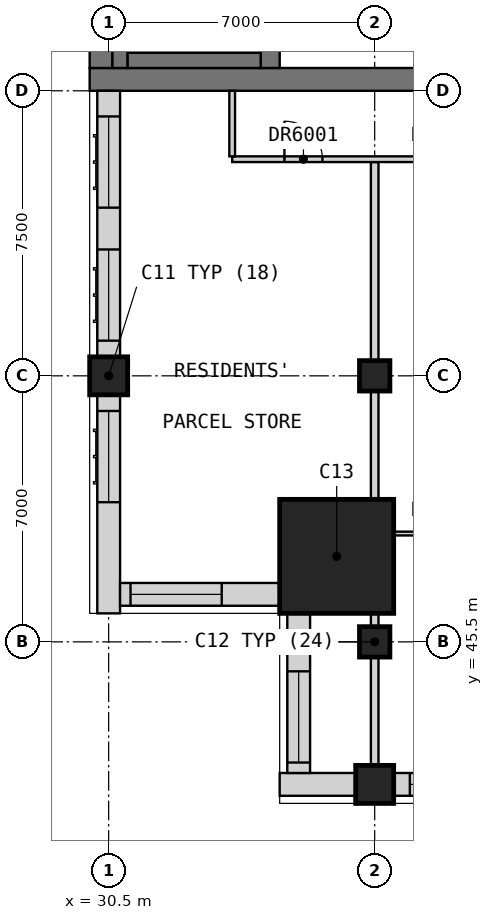
"""IFC4 building model, lengths in metres.
Left out: names, types, materials, properties, quantities, classifications, styles, units other than length and angle.
Written with IfcOpenShell. Run it as: python <this file> out.ifc"""

import sys

from ifc_helpers import new_model, si_unit, direction, frame, frame_2d, origin, origin_2d, place, context, subcontext, project, spatial, rectangle, extrude, element, fill, save


model = new_model("IFC4")
c1 = context("Model", 3, precision=1e-05, world=origin(), true_north=direction((0.0, 1.0)))
c2 = subcontext(c1, "Body", "Model", "MODEL_VIEW")
j1 = project(units=[si_unit("LENGTHUNIT", "METRE"), si_unit("PLANEANGLEUNIT", "RADIAN")], contexts=[c1])
p1 = place(None, origin())
s1 = spatial("IfcSite", under=j1, at=p1, CompositionType="ELEMENT")
p2 = place(p1, origin())
s2 = spatial("IfcBuilding", under=s1, at=p2, CompositionType="ELEMENT")
p3 = place(p2, frame((0.0, 0.0, 226.7)))
s3 = spatial("IfcBuildingStorey", under=s2, at=p3, CompositionType="ELEMENT", Elevation=226.7)
for number, where, z_axis, x_axis in (
    (1, (37.5, 41.75, 0.0), (0.0, 0.0, 1.0), (1.0, 0.0, 0.0)),
    (2, (30.5, 52.5, 0.0), (0.0, 0.0, 1.0), (1.0, 0.0, 0.0)),
):
    element("IfcColumn", number, at=place(p3, frame(where, z_axis=z_axis, x_axis=x_axis)), inside=s3, PredefinedType="COLUMN", context=c2, shape_type="SweptSolid", body=[
        extrude(rectangle(XDim=1.0, YDim=1.0, at=origin_2d()), origin(), (0.0, 0.0, 1.0), 3.5),
    ])
for number, where, z_axis, x_axis in (
    (3, (37.5, 45.5, 0.0), (0.0, 0.0, 1.0), (1.0, 0.0, 0.0)),
    (4, (37.5, 52.5, 0.0), (0.0, 0.0, 1.0), (1.0, 0.0, 0.0)),
):
    element("IfcColumn", number, at=place(p3, frame(where, z_axis=z_axis, x_axis=x_axis)), inside=s3, PredefinedType="COLUMN", context=c2, shape_type="SweptSolid", body=[
        extrude(rectangle(XDim=0.8, YDim=0.8, at=origin_2d()), origin(), (0.0, 0.0, 1.0), 3.5),
    ])
p4 = place(p3, frame((36.5, 47.75, 0.0), z_axis=(0.0, 0.0, 1.0), x_axis=(1.0, 0.0, 0.0)))
e5 = element("IfcColumn", 5, at=p4, inside=s3, PredefinedType="COLUMN", context=c2, shape_type="SweptSolid", body=[
    extrude(rectangle(XDim=3.0, YDim=3.0, at=origin_2d()), origin(), (0.0, 0.0, 1.0), 3.5),
])
p5 = place(p3, frame((30.0, 60.3, 0.0), z_axis=(0.0, 0.0, 1.0), x_axis=(1.0, 0.0, 0.0)))
e6 = element("IfcWall", 6, at=p5, inside=s3, PredefinedType="SHEAR", context=c2, shape_type="SweptSolid", body=[
    extrude(rectangle(XDim=30.0, YDim=0.6, at=frame_2d((15.0, 0.0))), origin(), (0.0, 0.0, 1.0), 3.5),
])
p6 = place(p5, frame((21.9, 0.0, 0.0)))
e7 = element("IfcOpeningElement", 7, at=p6, cuts=e6, PredefinedType="OPENING", context=c2, shape_type="SweptSolid", body=[
    extrude(rectangle(XDim=1.8, YDim=2.1, at=frame_2d((0.9, 1.05))), frame((0.0, 0.31, 0.0), z_axis=(0.0, -1.0, 0.0), x_axis=(1.0, 0.0, 0.0)), (0.0, 0.0, 1.0), 0.62),
])
p7 = place(p5, frame((26.5, 0.0, 0.0)))
e8 = element("IfcOpeningElement", 8, at=p7, cuts=e6, PredefinedType="OPENING", context=c2, shape_type="SweptSolid", body=[
    extrude(rectangle(XDim=1.2, YDim=2.1, at=frame_2d((0.6, 1.05))), frame((0.0, 0.31, 0.0), z_axis=(0.0, -1.0, 0.0), x_axis=(1.0, 0.0, 0.0)), (0.0, 0.0, 1.0), 0.62),
])
p8 = place(p3, frame((30.3, 60.6, 0.0), z_axis=(0.0, 0.0, 1.0), x_axis=(0.0, 1.0, 0.0)))
e9 = element("IfcWall", 9, at=p8, inside=s3, PredefinedType="SHEAR", context=c2, shape_type="SweptSolid", body=[
    extrude(rectangle(XDim=21.3, YDim=0.6, at=frame_2d((10.65, 0.0))), origin(), (0.0, 0.0, 1.0), 3.5),
])
p9 = place(p3, frame((34.75, 60.6, 0.0), z_axis=(0.0, 0.0, 1.0), x_axis=(0.0, 1.0, 0.0)))
e10 = element("IfcWall", 10, at=p9, inside=s3, PredefinedType="SHEAR", context=c2, shape_type="SweptSolid", body=[
    extrude(rectangle(XDim=3.6, YDim=0.5, at=frame_2d((1.8, 0.0))), origin(), (0.0, 0.0, 1.0), 3.5),
])
p10 = place(p3, frame((35.0, 41.75, 0.0), z_axis=(0.0, 0.0, 1.0), x_axis=(1.0, 0.0, 0.0)))
e11 = element("IfcWall", 11, at=p10, inside=s3, PredefinedType="SOLIDWALL", context=c2, shape_type="SweptSolid", body=[
    extrude(rectangle(XDim=2.0, YDim=0.6, at=frame_2d((1.0, 0.0))), origin(), (0.0, 0.0, 1.0), 3.25),
])
p11 = place(p3, frame((38.0, 41.75, 0.0), z_axis=(0.0, 0.0, 1.0), x_axis=(1.0, 0.0, 0.0)))
e12 = element("IfcWall", 12, at=p11, inside=s3, PredefinedType="SOLIDWALL", context=c2, shape_type="SweptSolid", body=[
    extrude(rectangle(XDim=6.5, YDim=0.6, at=frame_2d((3.25, 0.0))), origin(), (0.0, 0.0, 1.0), 2.75),
])
p12 = place(p11, frame((0.425, 0.0, 0.8)))
e13 = element("IfcOpeningElement", 13, at=p12, cuts=e12, PredefinedType="OPENING", context=c2, shape_type="SweptSolid", body=[
    extrude(rectangle(XDim=2.4, YDim=1.8, at=frame_2d((1.2, 0.9))), frame((0.0, 0.31, 0.0), z_axis=(0.0, -1.0, 0.0), x_axis=(1.0, 0.0, 0.0)), (0.0, 0.0, 1.0), 0.62),
])
p13 = place(p11, frame((3.675, 0.0, 0.8)))
e14 = element("IfcOpeningElement", 14, at=p13, cuts=e12, PredefinedType="OPENING", context=c2, shape_type="SweptSolid", body=[
    extrude(rectangle(XDim=2.4, YDim=1.8, at=frame_2d((1.2, 0.9))), frame((0.0, 0.31, 0.0), z_axis=(0.0, -1.0, 0.0), x_axis=(1.0, 0.0, 0.0)), (0.0, 0.0, 1.0), 0.62),
])
p14 = place(p3, frame((30.5, 60.0, 0.0), z_axis=(0.0, 0.0, 1.0), x_axis=(0.0, -1.0, 0.0)))
e15 = element("IfcWall", 15, at=p14, inside=s3, PredefinedType="SOLIDWALL", context=c2, shape_type="SweptSolid", body=[
    extrude(rectangle(XDim=7.0, YDim=0.6, at=frame_2d((3.5, 0.0))), origin(), (0.0, 0.0, 1.0), 3.25),
])
p15 = place(p14, frame((4.175, 0.0, 0.8)))
e16 = element("IfcOpeningElement", 16, at=p15, cuts=e15, PredefinedType="OPENING", context=c2, shape_type="SweptSolid", body=[
    extrude(rectangle(XDim=2.4, YDim=1.8, at=frame_2d((1.2, 0.9))), frame((0.0, 0.31, 0.0), z_axis=(0.0, -1.0, 0.0), x_axis=(1.0, 0.0, 0.0)), (0.0, 0.0, 1.0), 0.62),
])
p16 = place(p14, frame((0.675, 0.0, 0.8)))
e17 = element("IfcOpeningElement", 17, at=p16, cuts=e15, PredefinedType="OPENING", context=c2, shape_type="SweptSolid", body=[
    extrude(rectangle(XDim=2.4, YDim=1.8, at=frame_2d((1.2, 0.9))), frame((0.0, 0.31, 0.0), z_axis=(0.0, -1.0, 0.0), x_axis=(1.0, 0.0, 0.0)), (0.0, 0.0, 1.0), 0.62),
])
p17 = place(p3, frame((30.5, 52.0, 0.0), z_axis=(0.0, 0.0, 1.0), x_axis=(0.0, -1.0, 0.0)))
e18 = element("IfcWall", 18, at=p17, inside=s3, PredefinedType="SOLIDWALL", context=c2, shape_type="SweptSolid", body=[
    extrude(rectangle(XDim=5.75, YDim=0.6, at=frame_2d((2.875, 0.0))), origin(), (0.0, 0.0, 1.0), 2.75),
])
p18 = place(p17, frame((0.425, 0.0, 0.8)))
e19 = element("IfcOpeningElement", 19, at=p18, cuts=e18, PredefinedType="OPENING", context=c2, shape_type="SweptSolid", body=[
    extrude(rectangle(XDim=2.4, YDim=1.8, at=frame_2d((1.2, 0.9))), frame((0.0, 0.31, 0.0), z_axis=(0.0, -1.0, 0.0), x_axis=(1.0, 0.0, 0.0)), (0.0, 0.0, 1.0), 0.62),
])
p19 = place(p3, frame((30.8, 46.75, 0.0), z_axis=(0.0, 0.0, 1.0), x_axis=(1.0, 0.0, 0.0)))
e20 = element("IfcWall", 20, at=p19, inside=s3, PredefinedType="SOLIDWALL", context=c2, shape_type="SweptSolid", body=[
    extrude(rectangle(XDim=4.2, YDim=0.6, at=frame_2d((2.1, 0.0))), origin(), (0.0, 0.0, 1.0), 3.25),
])
p20 = place(p19, frame((0.275, 0.0, 0.8)))
e21 = element("IfcOpeningElement", 21, at=p20, cuts=e20, PredefinedType="OPENING", context=c2, shape_type="SweptSolid", body=[
    extrude(rectangle(XDim=2.4, YDim=1.8, at=frame_2d((1.2, 0.9))), frame((0.0, 0.31, 0.0), z_axis=(0.0, -1.0, 0.0), x_axis=(1.0, 0.0, 0.0)), (0.0, 0.0, 1.0), 0.62),
])
p21 = place(p3, frame((35.5, 46.25, 0.0), z_axis=(0.0, 0.0, 1.0), x_axis=(0.0, -1.0, 0.0)))
e22 = element("IfcWall", 22, at=p21, inside=s3, PredefinedType="SOLIDWALL", context=c2, shape_type="SweptSolid", body=[
    extrude(rectangle(XDim=4.2, YDim=0.6, at=frame_2d((2.1, 0.0))), origin(), (0.0, 0.0, 1.0), 3.25),
])
p22 = place(p21, frame((1.525, 0.0, 0.8)))
e23 = element("IfcOpeningElement", 23, at=p22, cuts=e22, PredefinedType="OPENING", context=c2, shape_type="SweptSolid", body=[
    extrude(rectangle(XDim=2.4, YDim=1.8, at=frame_2d((1.2, 0.9))), frame((0.0, 0.31, 0.0), z_axis=(0.0, -1.0, 0.0), x_axis=(1.0, 0.0, 0.0)), (0.0, 0.0, 1.0), 0.62),
])
p23 = place(p3, frame((30.8, 60.6, 0.0), z_axis=(0.0, 0.0, 1.0), x_axis=(0.0, 1.0, 0.0)))
e24 = element("IfcWall", 24, at=p23, inside=s3, PredefinedType="SOLIDWALL", context=c2, shape_type="SweptSolid", body=[
    extrude(rectangle(XDim=21.3, YDim=0.4, at=frame_2d((10.65, 0.0))), origin(), (0.0, 0.0, 1.0), 3.25),
])
p24 = place(p3, frame((31.0, 60.8, 0.0), z_axis=(0.0, 0.0, 1.0), x_axis=(1.0, 0.0, 0.0)))
e25 = element("IfcWall", 25, at=p24, inside=s3, PredefinedType="SOLIDWALL", context=c2, shape_type="SweptSolid", body=[
    extrude(rectangle(XDim=3.5, YDim=0.4, at=frame_2d((1.75, 0.0))), origin(), (0.0, 0.0, 1.0), 3.25),
])
p25 = place(p3, frame((37.5, 41.25, 0.0), z_axis=(0.0, 0.0, 1.0), x_axis=(0.0, 1.0, 0.0)))
e26 = element("IfcWall", 26, at=p25, inside=s3, PredefinedType="PARTITIONING", context=c2, shape_type="SweptSolid", body=[
    extrude(rectangle(XDim=16.875, YDim=0.2, at=frame_2d((8.438, 0.0))), origin(), (0.0, 0.0, 1.0), 2.75),
])
p26 = place(p3, frame((33.75, 58.2, 0.0), z_axis=(0.0, 0.0, 1.0), x_axis=(1.0, 0.0, 0.0)))
e27 = element("IfcWall", 27, at=p26, inside=s3, PredefinedType="PARTITIONING", context=c2, shape_type="SweptSolid", body=[
    extrude(rectangle(XDim=28.05, YDim=0.15, at=frame_2d((14.025, 0.0))), origin(), (0.0, 0.0, 1.0), 3.25),
])
p27 = place(p26, frame((1.375, 0.0, 0.0)))
e28 = element("IfcOpeningElement", 28, at=p27, cuts=e27, PredefinedType="OPENING", context=c2, shape_type="SweptSolid", body=[
    extrude(rectangle(XDim=1.0, YDim=2.1, at=frame_2d((0.5, 1.05))), frame((0.0, 0.085, 0.0), z_axis=(0.0, -1.0, 0.0), x_axis=(1.0, 0.0, 0.0)), (0.0, 0.0, 1.0), 0.17),
])
p28 = place(p26, frame((5.175, 0.0, 0.0)))
e29 = element("IfcOpeningElement", 29, at=p28, cuts=e27, PredefinedType="OPENING", context=c2, shape_type="SweptSolid", body=[
    extrude(rectangle(XDim=0.9, YDim=2.1, at=frame_2d((0.45, 1.05))), frame((0.0, 0.085, 0.0), z_axis=(0.0, -1.0, 0.0), x_axis=(1.0, 0.0, 0.0)), (0.0, 0.0, 1.0), 0.17),
])
p29 = place(p26, frame((12.675, 0.0, 0.0)))
e30 = element("IfcOpeningElement", 30, at=p29, cuts=e27, PredefinedType="OPENING", context=c2, shape_type="SweptSolid", body=[
    extrude(rectangle(XDim=0.9, YDim=2.1, at=frame_2d((0.45, 1.05))), frame((0.0, 0.085, 0.0), z_axis=(0.0, -1.0, 0.0), x_axis=(1.0, 0.0, 0.0)), (0.0, 0.0, 1.0), 0.17),
])
p30 = place(p26, frame((20.175, 0.0, 0.0)))
e31 = element("IfcOpeningElement", 31, at=p30, cuts=e27, PredefinedType="OPENING", context=c2, shape_type="SweptSolid", body=[
    extrude(rectangle(XDim=0.9, YDim=2.1, at=frame_2d((0.45, 1.05))), frame((0.0, 0.085, 0.0), z_axis=(0.0, -1.0, 0.0), x_axis=(1.0, 0.0, 0.0)), (0.0, 0.0, 1.0), 0.17),
])
p31 = place(p26, frame((26.7, 0.0, 0.0)))
e32 = element("IfcOpeningElement", 32, at=p31, cuts=e27, PredefinedType="OPENING", context=c2, shape_type="SweptSolid", body=[
    extrude(rectangle(XDim=0.9, YDim=2.1, at=frame_2d((0.45, 1.05))), frame((0.0, 0.085, 0.0), z_axis=(0.0, -1.0, 0.0), x_axis=(1.0, 0.0, 0.0)), (0.0, 0.0, 1.0), 0.17),
])
p32 = place(p3, frame((33.75, 58.275, 0.0), z_axis=(0.0, 0.0, 1.0), x_axis=(0.0, 1.0, 0.0)))
e33 = element("IfcWall", 33, at=p32, inside=s3, PredefinedType="PARTITIONING", context=c2, shape_type="SweptSolid", body=[
    extrude(rectangle(XDim=1.725, YDim=0.15, at=frame_2d((0.863, 0.0))), origin(), (0.0, 0.0, 1.0), 3.25),
])
p33 = place(p3, frame((37.6, 48.35, 0.0), z_axis=(0.0, 0.0, 1.0), x_axis=(1.0, 0.0, 0.0)))
e34 = element("IfcWall", 34, at=p33, inside=s3, PredefinedType="PARTITIONING", context=c2, shape_type="SweptSolid", body=[
    extrude(rectangle(XDim=22.3, YDim=0.1, at=frame_2d((11.15, 0.0))), origin(), (0.0, 0.0, 1.0), 3.25),
])
p34 = place(p33, frame((1.325, 0.0, 0.0)))
e35 = element("IfcOpeningElement", 35, at=p34, cuts=e34, PredefinedType="OPENING", context=c2, shape_type="SweptSolid", body=[
    extrude(rectangle(XDim=0.9, YDim=2.1, at=frame_2d((0.45, 1.05))), frame((0.0, 0.06, 0.0), z_axis=(0.0, -1.0, 0.0), x_axis=(1.0, 0.0, 0.0)), (0.0, 0.0, 1.0), 0.12),
])
p35 = place(p33, frame((8.825, 0.0, 0.0)))
e36 = element("IfcOpeningElement", 36, at=p35, cuts=e34, PredefinedType="OPENING", context=c2, shape_type="SweptSolid", body=[
    extrude(rectangle(XDim=0.9, YDim=2.1, at=frame_2d((0.45, 1.05))), frame((0.0, 0.06, 0.0), z_axis=(0.0, -1.0, 0.0), x_axis=(1.0, 0.0, 0.0)), (0.0, 0.0, 1.0), 0.12),
])
p36 = place(p33, frame((16.325, 0.0, 0.0)))
e37 = element("IfcOpeningElement", 37, at=p36, cuts=e34, PredefinedType="OPENING", context=c2, shape_type="SweptSolid", body=[
    extrude(rectangle(XDim=0.9, YDim=2.1, at=frame_2d((0.45, 1.05))), frame((0.0, 0.06, 0.0), z_axis=(0.0, -1.0, 0.0), x_axis=(1.0, 0.0, 0.0)), (0.0, 0.0, 1.0), 0.12),
])
p37 = place(p12, origin())
e38 = element("IfcWindow", 38, at=p37, inside=s3, PartitioningType="SINGLE_PANEL", PredefinedType="WINDOW", context=c2, shape_type="SweptSolid", body=[
    extrude(rectangle(XDim=2.4, YDim=1.8, at=frame_2d((1.2, 0.9))), frame((0.0, -0.07, 0.0), z_axis=(0.0, -1.0, 0.0), x_axis=(1.0, 0.0, 0.0)), (0.0, 0.0, 1.0), 0.06),
])
fill(e13, e38)
p38 = place(p15, origin())
e39 = element("IfcWindow", 39, at=p38, inside=s3, PartitioningType="SINGLE_PANEL", PredefinedType="WINDOW", context=c2, shape_type="SweptSolid", body=[
    extrude(rectangle(XDim=2.4, YDim=1.8, at=frame_2d((1.2, 0.9))), frame((0.0, -0.07, 0.0), z_axis=(0.0, -1.0, 0.0), x_axis=(1.0, 0.0, 0.0)), (0.0, 0.0, 1.0), 0.06),
])
fill(e16, e39)
p39 = place(p16, origin())
e40 = element("IfcWindow", 40, at=p39, inside=s3, PartitioningType="SINGLE_PANEL", PredefinedType="WINDOW", context=c2, shape_type="SweptSolid", body=[
    extrude(rectangle(XDim=2.4, YDim=1.8, at=frame_2d((1.2, 0.9))), frame((0.0, -0.07, 0.0), z_axis=(0.0, -1.0, 0.0), x_axis=(1.0, 0.0, 0.0)), (0.0, 0.0, 1.0), 0.06),
])
fill(e17, e40)
p40 = place(p18, origin())
e41 = element("IfcWindow", 41, at=p40, inside=s3, PartitioningType="SINGLE_PANEL", PredefinedType="WINDOW", context=c2, shape_type="SweptSolid", body=[
    extrude(rectangle(XDim=2.4, YDim=1.8, at=frame_2d((1.2, 0.9))), frame((0.0, -0.07, 0.0), z_axis=(0.0, -1.0, 0.0), x_axis=(1.0, 0.0, 0.0)), (0.0, 0.0, 1.0), 0.06),
])
fill(e19, e41)
p41 = place(p20, origin())
e42 = element("IfcWindow", 42, at=p41, inside=s3, PartitioningType="SINGLE_PANEL", PredefinedType="WINDOW", context=c2, shape_type="SweptSolid", body=[
    extrude(rectangle(XDim=2.4, YDim=1.8, at=frame_2d((1.2, 0.9))), frame((0.0, -0.07, 0.0), z_axis=(0.0, -1.0, 0.0), x_axis=(1.0, 0.0, 0.0)), (0.0, 0.0, 1.0), 0.06),
])
fill(e21, e42)
p42 = place(p22, origin())
e43 = element("IfcWindow", 43, at=p42, inside=s3, PartitioningType="SINGLE_PANEL", PredefinedType="WINDOW", context=c2, shape_type="SweptSolid", body=[
    extrude(rectangle(XDim=2.4, YDim=1.8, at=frame_2d((1.2, 0.9))), frame((0.0, -0.07, 0.0), z_axis=(0.0, -1.0, 0.0), x_axis=(1.0, 0.0, 0.0)), (0.0, 0.0, 1.0), 0.06),
])
fill(e23, e43)
p43 = place(p27, origin())
e44 = element("IfcDoor", 44, at=p43, inside=s3, OperationType="SINGLE_SWING_RIGHT", PredefinedType="DOOR", context=c2, shape_type="SweptSolid", body=[
    extrude(rectangle(XDim=1.0, YDim=2.1, at=frame_2d((0.5, 1.05))), frame((0.0, 0.025, 0.0), z_axis=(0.0, -1.0, 0.0), x_axis=(1.0, 0.0, 0.0)), (0.0, 0.0, 1.0), 0.05),
])
fill(e28, e44)
save(model, sys.argv[1])
